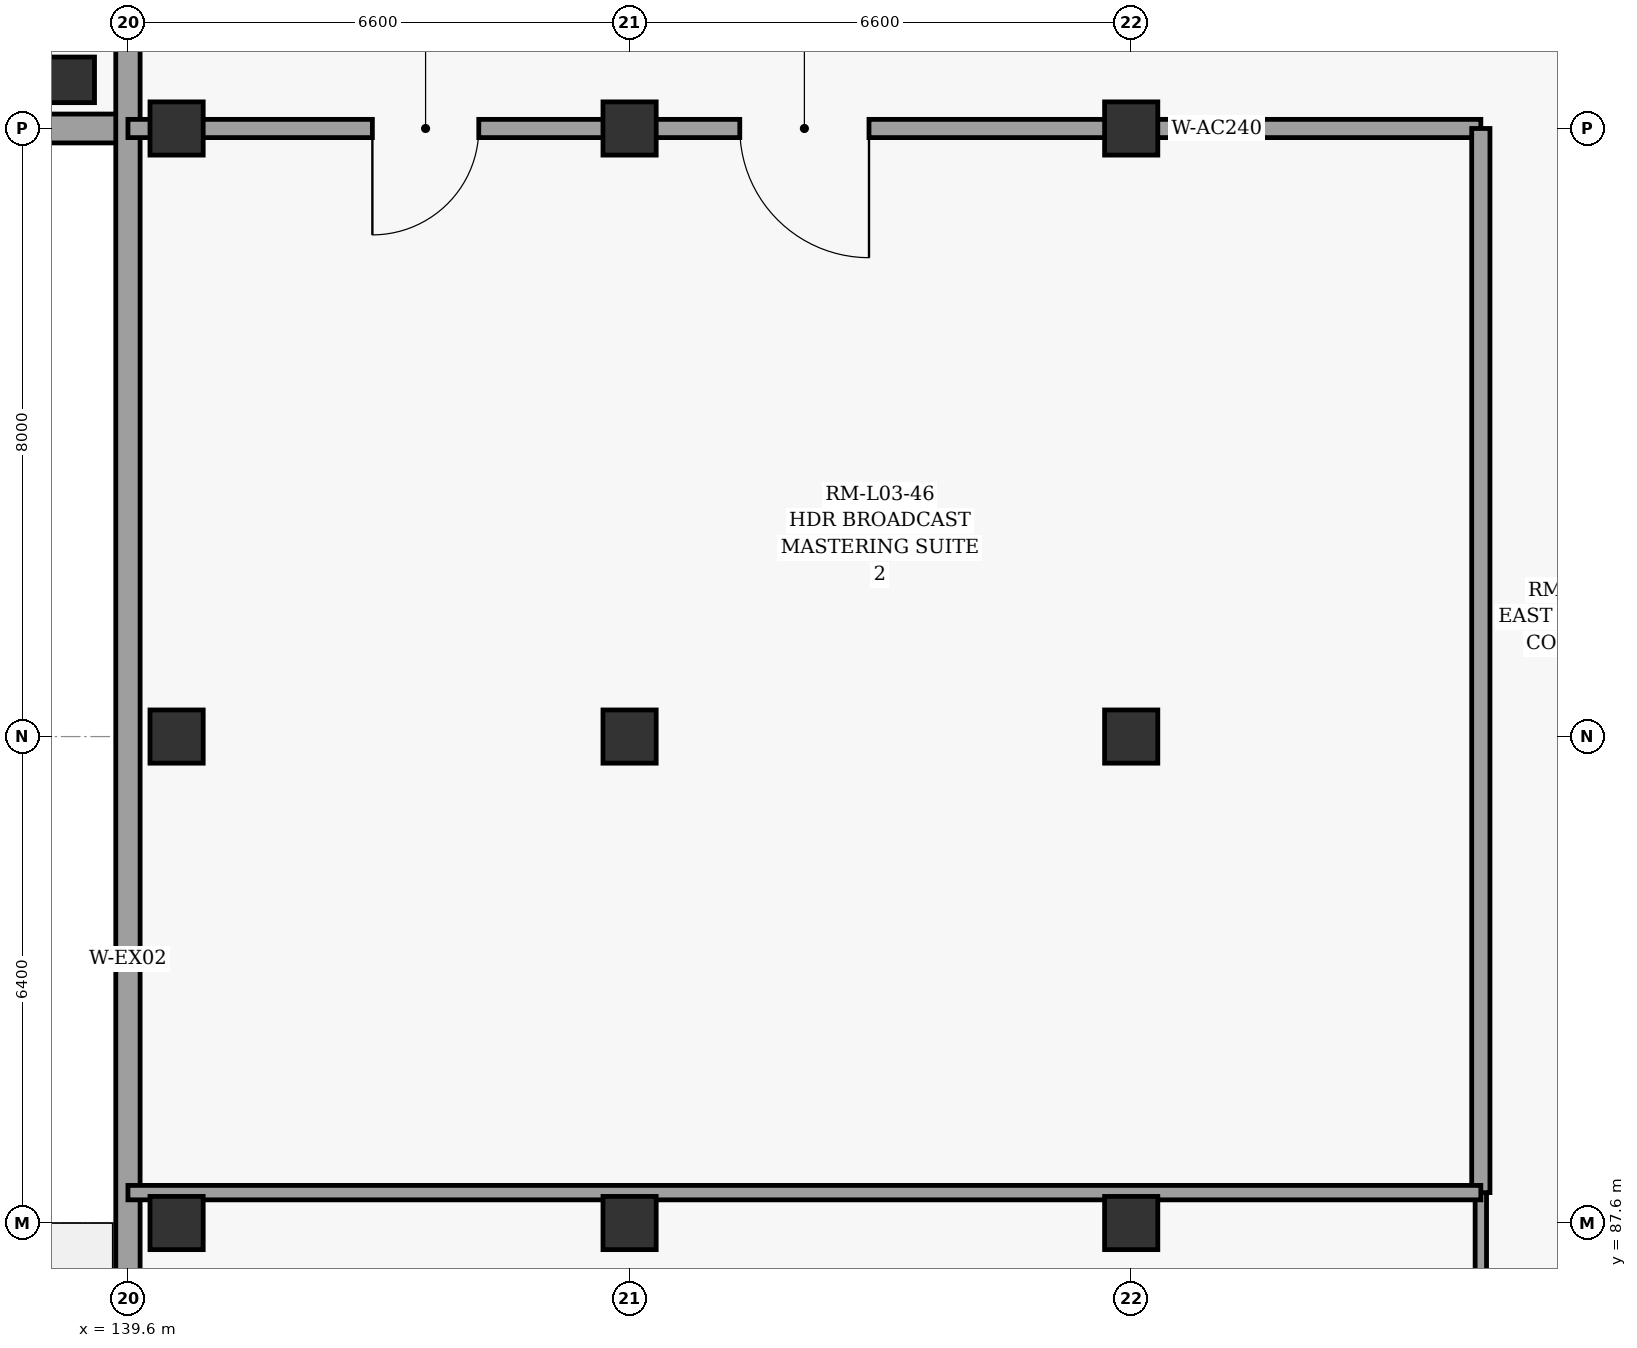
"""IFC4 building model, lengths in metres.
Left out: names, types, materials, properties, quantities, classifications, styles, units other than length and angle.
Written with IfcOpenShell. Run it as: python <this file> out.ifc"""

import sys

from ifc_helpers import new_model, si_unit, direction, frame, frame_2d, origin, origin_2d, place, context, subcontext, project, spatial, rectangle, extrude, element, fill, save


model = new_model("IFC4")
c1 = context("Model", 3, precision=1e-05, world=origin(), true_north=direction((0.0, 1.0)))
c2 = subcontext(c1, "Body", "Model", "MODEL_VIEW")
j1 = project(units=[si_unit("LENGTHUNIT", "METRE"), si_unit("PLANEANGLEUNIT", "RADIAN")], contexts=[c1])
p1 = place(None, origin())
s1 = spatial("IfcSite", under=j1, at=p1, CompositionType="ELEMENT")
p2 = place(p1, origin())
s2 = spatial("IfcBuilding", under=s1, at=p2, CompositionType="ELEMENT")
p3 = place(p2, frame((0.0, 0.0, 15.6)))
s3 = spatial("IfcBuildingStorey", under=s2, at=p3, CompositionType="ELEMENT", Elevation=15.6)
p4 = place(p3, frame((138.86, 102.64, 0.0), z_axis=(0.0, 0.0, 1.0), x_axis=(1.0, 0.0, 0.0)))
e1 = element("IfcColumn", 1, at=p4, inside=s3, PredefinedType="COLUMN", context=c2, shape_type="SweptSolid", body=[
    extrude(rectangle(XDim=0.6, YDim=0.6, at=origin_2d()), origin(), (0.0, 0.0, 1.0), 4.8),
])
for number, where, z_axis, x_axis in (
    (2, (140.24, 87.6, 0.0), (0.0, 0.0, 1.0), (1.0, 0.0, 0.0)),
    (3, (140.24, 94.0, 0.0), (0.0, 0.0, 1.0), (1.0, 0.0, 0.0)),
    (4, (140.24, 102.0, 0.0), (0.0, 0.0, 1.0), (1.0, 0.0, 0.0)),
    (5, (146.2, 87.6, 0.0), (0.0, 0.0, 1.0), (1.0, 0.0, 0.0)),
    (6, (146.2, 94.0, 0.0), (0.0, 0.0, 1.0), (1.0, 0.0, 0.0)),
    (7, (146.2, 102.0, 0.0), (0.0, 0.0, 1.0), (1.0, 0.0, 0.0)),
    (8, (152.8, 87.6, 0.0), (0.0, 0.0, 1.0), (1.0, 0.0, 0.0)),
    (9, (152.8, 94.0, 0.0), (0.0, 0.0, 1.0), (1.0, 0.0, 0.0)),
    (10, (152.8, 102.0, 0.0), (0.0, 0.0, 1.0), (1.0, 0.0, 0.0)),
):
    element("IfcColumn", number, at=place(p3, frame(where, z_axis=z_axis, x_axis=x_axis)), inside=s3, PredefinedType="COLUMN", context=c2, shape_type="SweptSolid", body=[
        extrude(rectangle(XDim=0.7, YDim=0.7, at=origin_2d()), origin(), (0.0, 0.0, 1.0), 4.8),
    ])
p5 = place(p3, frame((139.5, 102.0, 0.0), z_axis=(0.0, 0.0, 1.0), x_axis=(-1.0, 0.0, 0.0)))
e11 = element("IfcWall", 11, at=p5, inside=s3, PredefinedType="SOLIDWALL", context=c2, shape_type="SweptSolid", body=[
    extrude(rectangle(XDim=28.7, YDim=0.38, at=frame_2d((14.35, 0.0))), origin(), (0.0, 0.0, 1.0), 4.555),
])
p6 = place(p5, frame((2.2, 0.0, 0.9)))
e12 = element("IfcOpeningElement", 12, at=p6, cuts=e11, PredefinedType="OPENING", context=c2, shape_type="SweptSolid", body=[
    extrude(rectangle(XDim=3.2, YDim=1.85, at=frame_2d((1.6, 0.925))), frame((0.0, 0.2, 0.0), z_axis=(0.0, -1.0, 0.0), x_axis=(1.0, 0.0, 0.0)), (0.0, 0.0, 1.0), 0.4),
])
p7 = place(p5, frame((8.475, 0.0, 0.9)))
e13 = element("IfcOpeningElement", 13, at=p7, cuts=e11, PredefinedType="OPENING", context=c2, shape_type="SweptSolid", body=[
    extrude(rectangle(XDim=3.4, YDim=1.85, at=frame_2d((1.7, 0.925))), frame((0.0, 0.2, 0.0), z_axis=(0.0, -1.0, 0.0), x_axis=(1.0, 0.0, 0.0)), (0.0, 0.0, 1.0), 0.4),
])
p8 = place(p5, frame((14.75, 0.0, 0.9)))
e14 = element("IfcOpeningElement", 14, at=p8, cuts=e11, PredefinedType="OPENING", context=c2, shape_type="SweptSolid", body=[
    extrude(rectangle(XDim=3.6, YDim=1.9, at=frame_2d((1.8, 0.95))), frame((0.0, 0.2, 0.0), z_axis=(0.0, -1.0, 0.0), x_axis=(1.0, 0.0, 0.0)), (0.0, 0.0, 1.0), 0.4),
])
p9 = place(p5, frame((21.025, 0.0, 0.9)))
e15 = element("IfcOpeningElement", 15, at=p9, cuts=e11, PredefinedType="OPENING", context=c2, shape_type="SweptSolid", body=[
    extrude(rectangle(XDim=3.8, YDim=1.9, at=frame_2d((1.9, 0.95))), frame((0.0, 0.2, 0.0), z_axis=(0.0, -1.0, 0.0), x_axis=(1.0, 0.0, 0.0)), (0.0, 0.0, 1.0), 0.4),
])
p10 = place(p3, frame((139.6, 71.74, 0.0), z_axis=(0.0, 0.0, 1.0), x_axis=(0.0, 1.0, 0.0)))
e16 = element("IfcWall", 16, at=p10, inside=s3, PredefinedType="SOLIDWALL", context=c2, shape_type="SweptSolid", body=[
    extrude(rectangle(XDim=46.12, YDim=0.32, at=frame_2d((23.06, 0.0))), origin(), (0.0, 0.0, 1.0), 4.58),
])
p11 = place(p10, frame((31.38, 0.0, 0.0)))
e17 = element("IfcOpeningElement", 17, at=p11, cuts=e16, PredefinedType="OPENING", context=c2, shape_type="SweptSolid", body=[
    extrude(rectangle(XDim=1.4, YDim=2.25, at=frame_2d((0.7, 1.125))), frame((0.0, 0.17, 0.0), z_axis=(0.0, -1.0, 0.0), x_axis=(1.0, 0.0, 0.0)), (0.0, 0.0, 1.0), 0.34),
])
p12 = place(p3, frame((157.4, 102.0, 0.0), z_axis=(0.0, 0.0, 1.0), x_axis=(-1.0, 0.0, 0.0)))
e18 = element("IfcWall", 18, at=p12, inside=s3, PredefinedType="PARTITIONING", context=c2, shape_type="SweptSolid", body=[
    extrude(rectangle(XDim=17.8, YDim=0.24, at=frame_2d((8.9, 0.0))), origin(), (0.0, 0.0, 1.0), 3.93),
])
p13 = place(p12, frame((8.05, 0.0, 0.0)))
e19 = element("IfcOpeningElement", 19, at=p13, cuts=e18, PredefinedType="OPENING", context=c2, shape_type="SweptSolid", body=[
    extrude(rectangle(XDim=1.7, YDim=2.3, at=frame_2d((0.85, 1.15))), frame((0.0, 0.13, 0.0), z_axis=(0.0, -1.0, 0.0), x_axis=(1.0, 0.0, 0.0)), (0.0, 0.0, 1.0), 0.26),
])
p14 = place(p12, frame((13.184, 0.0, 0.0)))
e20 = element("IfcOpeningElement", 20, at=p14, cuts=e18, PredefinedType="OPENING", context=c2, shape_type="SweptSolid", body=[
    extrude(rectangle(XDim=1.4, YDim=2.25, at=frame_2d((0.7, 1.125))), frame((0.0, 0.13, 0.0), z_axis=(0.0, -1.0, 0.0), x_axis=(1.0, 0.0, 0.0)), (0.0, 0.0, 1.0), 0.26),
])
p15 = place(p3, frame((157.4, 71.6, 0.0), z_axis=(0.0, 0.0, 1.0), x_axis=(0.0, 1.0, 0.0)))
e21 = element("IfcWall", 21, at=p15, inside=s3, PredefinedType="PARTITIONING", context=c2, shape_type="SweptSolid", body=[
    extrude(rectangle(XDim=16.4, YDim=0.15, at=frame_2d((8.2, 0.0))), origin(), (0.0, 0.0, 1.0), 4.58),
])
p16 = place(p15, frame((8.58, 0.0, 0.0)))
e22 = element("IfcOpeningElement", 22, at=p16, cuts=e21, PredefinedType="OPENING", context=c2, shape_type="SweptSolid", body=[
    extrude(rectangle(XDim=1.65, YDim=2.3, at=frame_2d((0.825, 1.15))), frame((0.0, 0.085, 0.0), z_axis=(0.0, -1.0, 0.0), x_axis=(1.0, 0.0, 0.0)), (0.0, 0.0, 1.0), 0.17),
])
p17 = place(p15, frame((11.967, 0.0, 0.0)))
e23 = element("IfcOpeningElement", 23, at=p17, cuts=e21, PredefinedType="OPENING", context=c2, shape_type="SweptSolid", body=[
    extrude(rectangle(XDim=1.65, YDim=2.3, at=frame_2d((0.825, 1.15))), frame((0.0, 0.085, 0.0), z_axis=(0.0, -1.0, 0.0), x_axis=(1.0, 0.0, 0.0)), (0.0, 0.0, 1.0), 0.17),
])
p18 = place(p3, frame((157.4, 88.0, 0.0), z_axis=(0.0, 0.0, 1.0), x_axis=(0.0, 1.0, 0.0)))
e24 = element("IfcWall", 24, at=p18, inside=s3, PredefinedType="PARTITIONING", context=c2, shape_type="SweptSolid", body=[
    extrude(rectangle(XDim=14.0, YDim=0.24, at=frame_2d((7.0, 0.0))), origin(), (0.0, 0.0, 1.0), 4.58),
])
p19 = place(p3, frame((139.6, 88.0, 0.0), z_axis=(0.0, 0.0, 1.0), x_axis=(1.0, 0.0, 0.0)))
e25 = element("IfcWall", 25, at=p19, inside=s3, PredefinedType="PARTITIONING", context=c2, shape_type="SweptSolid", body=[
    extrude(rectangle(XDim=17.8, YDim=0.19, at=frame_2d((8.9, 0.0))), origin(), (0.0, 0.0, 1.0), 3.93),
])
p20 = place(p13, origin())
e26 = element("IfcDoor", 26, at=p20, inside=s3, OperationType="SINGLE_SWING_LEFT", PredefinedType="DOOR", context=c2, shape_type="SweptSolid", body=[
    extrude(rectangle(XDim=1.7, YDim=2.3, at=frame_2d((0.85, 1.15))), frame((0.0, 0.025, 0.0), z_axis=(0.0, -1.0, 0.0), x_axis=(1.0, 0.0, 0.0)), (0.0, 0.0, 1.0), 0.05),
])
fill(e19, e26)
p21 = place(p14, origin())
e27 = element("IfcDoor", 27, at=p21, inside=s3, OperationType="SINGLE_SWING_RIGHT", PredefinedType="DOOR", context=c2, shape_type="SweptSolid", body=[
    extrude(rectangle(XDim=1.4, YDim=2.25, at=frame_2d((0.7, 1.125))), frame((0.0, 0.025, 0.0), z_axis=(0.0, -1.0, 0.0), x_axis=(1.0, 0.0, 0.0)), (0.0, 0.0, 1.0), 0.05),
])
fill(e20, e27)
save(model, sys.argv[1])
